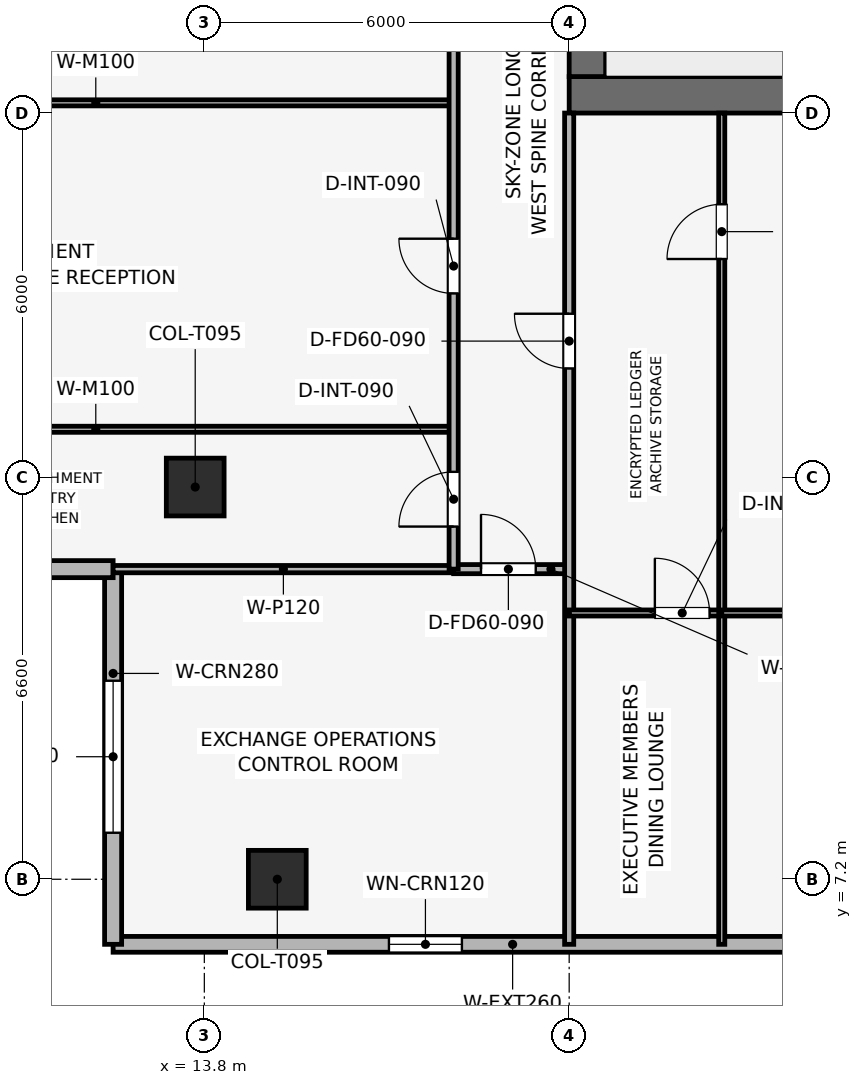
"""IFC4 building model, lengths in metres.
Left out: names, types, materials, properties, quantities, classifications, styles, units other than length and angle.
Written with IfcOpenShell. Run it as: python <this file> out.ifc"""

import sys

from ifc_helpers import new_model, si_unit, direction, frame, frame_2d, origin, origin_2d, place, context, subcontext, project, spatial, rectangle, extrude, element, fill, save


model = new_model("IFC4")
c1 = context("Model", 3, precision=1e-05, world=origin(), true_north=direction((0.0, 1.0)))
c2 = subcontext(c1, "Body", "Model", "MODEL_VIEW")
j1 = project(units=[si_unit("LENGTHUNIT", "METRE"), si_unit("PLANEANGLEUNIT", "RADIAN")], contexts=[c1])
p1 = place(None, origin())
s1 = spatial("IfcSite", under=j1, at=p1, CompositionType="ELEMENT")
p2 = place(p1, origin())
s2 = spatial("IfcBuilding", under=s1, at=p2, CompositionType="ELEMENT")
p3 = place(p2, frame((0.0, 0.0, 306.75)))
s3 = spatial("IfcBuildingStorey", under=s2, at=p3, CompositionType="ELEMENT", Elevation=306.75)
p4 = place(p3, frame((19.8, 20.1, 0.0), z_axis=(0.0, 0.0, 1.0), x_axis=(1.0, 0.0, 0.0)))
e1 = element("IfcWall", 1, at=p4, inside=s3, PredefinedType="SHEAR", context=c2, shape_type="SweptSolid", body=[
    extrude(rectangle(XDim=18.0, YDim=0.6, at=frame_2d((9.0, 0.0))), origin(), (0.0, 0.0, 1.0), 3.75),
])
p5 = place(p3, frame((20.1, 20.4, 0.0), z_axis=(0.0, 0.0, 1.0), x_axis=(0.0, 1.0, 0.0)))
e2 = element("IfcWall", 2, at=p5, inside=s3, PredefinedType="SHEAR", context=c2, shape_type="SweptSolid", body=[
    extrude(rectangle(XDim=16.8, YDim=0.6, at=frame_2d((8.4, 0.0))), origin(), (0.0, 0.0, 1.0), 3.75),
])
p6 = place(p5, frame((10.4, 0.0, 0.0)))
e3 = element("IfcOpeningElement", 3, at=p6, cuts=e2, PredefinedType="OPENING", context=c2, shape_type="SweptSolid", body=[
    extrude(rectangle(XDim=1.1, YDim=2.15, at=frame_2d((0.55, 1.075))), frame((0.0, 0.31, 0.0), z_axis=(0.0, -1.0, 0.0), x_axis=(1.0, 0.0, 0.0)), (0.0, 0.0, 1.0), 0.62),
])
for number, where, z_axis, x_axis in (
    (4, (15.0, 7.2, 0.003), (0.0, 0.0, 1.0), (1.0, 0.0, 0.0)),
    (5, (13.65, 13.65, 0.003), (0.0, 0.0, 1.0), (1.0, 0.0, 0.0)),
):
    element("IfcColumn", number, at=place(p3, frame(where, z_axis=z_axis, x_axis=x_axis)), inside=s3, PredefinedType="COLUMN", context=c2, shape_type="SweptSolid", body=[
        extrude(rectangle(XDim=0.95, YDim=0.95, at=origin_2d()), origin(), (0.0, 0.0, 1.0), 3.504),
    ])
p7 = place(p3, frame((24.0, 6.13, 0.0), z_axis=(0.0, 0.0, 1.0), x_axis=(-1.0, 0.0, 0.0)))
e6 = element("IfcWall", 6, at=p7, inside=s3, PredefinedType="SOLIDWALL", context=c2, shape_type="SweptSolid", body=[
    extrude(rectangle(XDim=11.7, YDim=0.26, at=frame_2d((5.85, 0.0))), origin(), (0.0, 0.0, 1.0), 3.51),
])
p8 = place(p7, frame((5.964, 0.0, 0.9)))
e7 = element("IfcOpeningElement", 7, at=p8, cuts=e6, PredefinedType="OPENING", context=c2, shape_type="SweptSolid", body=[
    extrude(rectangle(XDim=1.2, YDim=2.1, at=frame_2d((0.6, 1.05))), frame((0.0, 0.14, 0.0), z_axis=(0.0, -1.0, 0.0), x_axis=(1.0, 0.0, 0.0)), (0.0, 0.0, 1.0), 0.28),
])
p9 = place(p3, frame((12.3, 6.13, 0.0), z_axis=(0.0, 0.0, 1.0), x_axis=(0.0, 1.0, 0.0)))
e8 = element("IfcWall", 8, at=p9, inside=s3, PredefinedType="SOLIDWALL", context=c2, shape_type="SweptSolid", body=[
    extrude(rectangle(XDim=6.17, YDim=0.28, at=frame_2d((3.085, 0.0))), origin(), (0.0, 0.0, 1.0), 3.51),
])
p10 = place(p9, frame((1.835, 0.0, 0.9)))
e9 = element("IfcOpeningElement", 9, at=p10, cuts=e8, PredefinedType="OPENING", context=c2, shape_type="SweptSolid", body=[
    extrude(rectangle(XDim=2.5, YDim=1.9, at=frame_2d((1.25, 0.95))), frame((0.0, 0.15, 0.0), z_axis=(0.0, -1.0, 0.0), x_axis=(1.0, 0.0, 0.0)), (0.0, 0.0, 1.0), 0.3),
])
p11 = place(p3, frame((12.3, 12.3, 0.0), z_axis=(0.0, 0.0, 1.0), x_axis=(-1.0, 0.0, 0.0)))
e10 = element("IfcWall", 10, at=p11, inside=s3, PredefinedType="SOLIDWALL", context=c2, shape_type="SweptSolid", body=[
    extrude(rectangle(XDim=6.17, YDim=0.28, at=frame_2d((3.085, 0.0))), origin(), (0.0, 0.0, 1.0), 3.51),
])
p12 = place(p11, frame((1.835, 0.0, 0.9)))
e11 = element("IfcOpeningElement", 11, at=p12, cuts=e10, PredefinedType="OPENING", context=c2, shape_type="SweptSolid", body=[
    extrude(rectangle(XDim=2.5, YDim=1.9, at=frame_2d((1.25, 0.95))), frame((0.0, 0.15, 0.0), z_axis=(0.0, -1.0, 0.0), x_axis=(1.0, 0.0, 0.0)), (0.0, 0.0, 1.0), 0.3),
])
p13 = place(p3, frame((6.13, 14.6, 0.0), z_axis=(0.0, 0.0, 1.0), x_axis=(1.0, 0.0, 0.0)))
e12 = element("IfcWall", 12, at=p13, inside=s3, PredefinedType="MOVABLE", context=c2, shape_type="SweptSolid", body=[
    extrude(rectangle(XDim=11.77, YDim=0.1, at=frame_2d((5.885, 0.0))), origin(), (0.0, 0.0, 1.0), 3.095),
])
p14 = place(p3, frame((6.13, 19.968, 0.0), z_axis=(0.0, 0.0, 1.0), x_axis=(1.0, 0.0, 0.0)))
e13 = element("IfcWall", 13, at=p14, inside=s3, PredefinedType="MOVABLE", context=c2, shape_type="SweptSolid", body=[
    extrude(rectangle(XDim=11.77, YDim=0.1, at=frame_2d((5.885, 0.0))), origin(), (0.0, 0.0, 1.0), 3.195),
])
p15 = place(p3, frame((12.3, 12.3, 0.0), z_axis=(0.0, 0.0, 1.0), x_axis=(1.0, 0.0, 0.0)))
e14 = element("IfcWall", 14, at=p15, inside=s3, PredefinedType="PARTITIONING", context=c2, shape_type="SweptSolid", body=[
    extrude(rectangle(XDim=5.6, YDim=0.12, at=frame_2d((2.8, 0.0))), origin(), (0.0, 0.0, 1.0), 3.195),
])
p16 = place(p3, frame((17.9, 12.3, 0.0), z_axis=(0.0, 0.0, 1.0), x_axis=(1.0, 0.0, 0.0)))
e15 = element("IfcWall", 15, at=p16, inside=s3, PredefinedType="PARTITIONING", context=c2, shape_type="SweptSolid", body=[
    extrude(rectangle(XDim=1.9, YDim=0.15, at=frame_2d((0.95, 0.0))), origin(), (0.0, 0.0, 1.0), 3.51),
])
p17 = place(p16, frame((0.45, 0.0, 0.0)))
e16 = element("IfcOpeningElement", 16, at=p17, cuts=e15, PredefinedType="OPENING", context=c2, shape_type="SweptSolid", body=[
    extrude(rectangle(XDim=0.9, YDim=2.1, at=frame_2d((0.45, 1.05))), frame((0.0, 0.085, 0.0), z_axis=(0.0, -1.0, 0.0), x_axis=(1.0, 0.0, 0.0)), (0.0, 0.0, 1.0), 0.17),
])
p18 = place(p3, frame((19.8, 6.13, 0.0), z_axis=(0.0, 0.0, 1.0), x_axis=(0.0, 1.0, 0.0)))
e17 = element("IfcWall", 17, at=p18, inside=s3, PredefinedType="PARTITIONING", context=c2, shape_type="SweptSolid", body=[
    extrude(rectangle(XDim=13.67, YDim=0.15, at=frame_2d((6.835, 0.0))), origin(), (0.0, 0.0, 1.0), 3.095),
])
p19 = place(p18, frame((9.47, 0.0, 0.0)))
e18 = element("IfcOpeningElement", 18, at=p19, cuts=e17, PredefinedType="OPENING", context=c2, shape_type="SweptSolid", body=[
    extrude(rectangle(XDim=0.9, YDim=2.1, at=frame_2d((0.45, 1.05))), frame((0.0, 0.085, 0.0), z_axis=(0.0, -1.0, 0.0), x_axis=(1.0, 0.0, 0.0)), (0.0, 0.0, 1.0), 0.17),
])
p20 = place(p3, frame((19.8, 11.579, 0.0), z_axis=(0.0, 0.0, 1.0), x_axis=(1.0, 0.0, 0.0)))
e19 = element("IfcWall", 19, at=p20, inside=s3, PredefinedType="MOVABLE", context=c2, shape_type="SweptSolid", body=[
    extrude(rectangle(XDim=2.509, YDim=0.1, at=frame_2d((1.254, 0.0))), origin(), (0.0, 0.0, 1.0), 3.095),
])
p21 = place(p20, frame((1.409, 0.0, 0.0)))
e20 = element("IfcOpeningElement", 20, at=p21, cuts=e19, PredefinedType="OPENING", context=c2, shape_type="SweptSolid", body=[
    extrude(rectangle(XDim=0.9, YDim=2.1, at=frame_2d((0.45, 1.05))), frame((0.0, 0.06, 0.0), z_axis=(0.0, -1.0, 0.0), x_axis=(1.0, 0.0, 0.0)), (0.0, 0.0, 1.0), 0.12),
])
p22 = place(p3, frame((22.309, 6.13, 0.0), z_axis=(0.0, 0.0, 1.0), x_axis=(0.0, 1.0, 0.0)))
e21 = element("IfcWall", 21, at=p22, inside=s3, PredefinedType="MOVABLE", context=c2, shape_type="SweptSolid", body=[
    extrude(rectangle(XDim=13.67, YDim=0.1, at=frame_2d((6.835, 0.0))), origin(), (0.0, 0.0, 1.0), 3.135),
])
p23 = place(p22, frame((11.27, 0.0, 0.0)))
e22 = element("IfcOpeningElement", 22, at=p23, cuts=e21, PredefinedType="OPENING", context=c2, shape_type="SweptSolid", body=[
    extrude(rectangle(XDim=0.9, YDim=2.1, at=frame_2d((0.45, 1.05))), frame((0.0, 0.06, 0.0), z_axis=(0.0, -1.0, 0.0), x_axis=(1.0, 0.0, 0.0)), (0.0, 0.0, 1.0), 0.12),
])
p24 = place(p3, frame((22.309, 11.579, 0.0), z_axis=(0.0, 0.0, 1.0), x_axis=(1.0, 0.0, 0.0)))
e23 = element("IfcWall", 23, at=p24, inside=s3, PredefinedType="MOVABLE", context=c2, shape_type="SweptSolid", body=[
    extrude(rectangle(XDim=22.991, YDim=0.1, at=frame_2d((11.496, 0.0))), origin(), (0.0, 0.0, 1.0), 3.095),
])
p25 = place(p24, frame((12.853, 0.0, 0.0)))
e24 = element("IfcOpeningElement", 24, at=p25, cuts=e23, PredefinedType="OPENING", context=c2, shape_type="SweptSolid", body=[
    extrude(rectangle(XDim=0.9, YDim=2.1, at=frame_2d((0.45, 1.05))), frame((0.0, 0.06, 0.0), z_axis=(0.0, -1.0, 0.0), x_axis=(1.0, 0.0, 0.0)), (0.0, 0.0, 1.0), 0.12),
])
p26 = place(p3, frame((17.9, 12.3, 0.0), z_axis=(0.0, 0.0, 1.0), x_axis=(0.0, 1.0, 0.0)))
e25 = element("IfcWall", 25, at=p26, inside=s3, PredefinedType="PARTITIONING", context=c2, shape_type="SweptSolid", body=[
    extrude(rectangle(XDim=27.4, YDim=0.15, at=frame_2d((13.7, 0.0))), origin(), (0.0, 0.0, 1.0), 3.095),
])
p27 = place(p26, frame((0.7, 0.0, 0.0)))
e26 = element("IfcOpeningElement", 26, at=p27, cuts=e25, PredefinedType="OPENING", context=c2, shape_type="SweptSolid", body=[
    extrude(rectangle(XDim=0.9, YDim=2.1, at=frame_2d((0.45, 1.05))), frame((0.0, 0.085, 0.0), z_axis=(0.0, -1.0, 0.0), x_axis=(1.0, 0.0, 0.0)), (0.0, 0.0, 1.0), 0.17),
])
p28 = place(p26, frame((4.534, 0.0, 0.0)))
e27 = element("IfcOpeningElement", 27, at=p28, cuts=e25, PredefinedType="OPENING", context=c2, shape_type="SweptSolid", body=[
    extrude(rectangle(XDim=0.9, YDim=2.1, at=frame_2d((0.45, 1.05))), frame((0.0, 0.085, 0.0), z_axis=(0.0, -1.0, 0.0), x_axis=(1.0, 0.0, 0.0)), (0.0, 0.0, 1.0), 0.17),
])
p29 = place(p26, frame((11.234, 0.0, 0.0)))
e28 = element("IfcOpeningElement", 28, at=p29, cuts=e25, PredefinedType="OPENING", context=c2, shape_type="SweptSolid", body=[
    extrude(rectangle(XDim=0.9, YDim=2.1, at=frame_2d((0.45, 1.05))), frame((0.0, 0.085, 0.0), z_axis=(0.0, -1.0, 0.0), x_axis=(1.0, 0.0, 0.0)), (0.0, 0.0, 1.0), 0.17),
])
p30 = place(p26, frame((16.65, 0.0, 0.0)))
e29 = element("IfcOpeningElement", 29, at=p30, cuts=e25, PredefinedType="OPENING", context=c2, shape_type="SweptSolid", body=[
    extrude(rectangle(XDim=0.9, YDim=2.1, at=frame_2d((0.45, 1.05))), frame((0.0, 0.085, 0.0), z_axis=(0.0, -1.0, 0.0), x_axis=(1.0, 0.0, 0.0)), (0.0, 0.0, 1.0), 0.17),
])
p31 = place(p26, frame((19.55, 0.0, 0.0)))
e30 = element("IfcOpeningElement", 30, at=p31, cuts=e25, PredefinedType="OPENING", context=c2, shape_type="SweptSolid", body=[
    extrude(rectangle(XDim=0.9, YDim=2.1, at=frame_2d((0.45, 1.05))), frame((0.0, 0.085, 0.0), z_axis=(0.0, -1.0, 0.0), x_axis=(1.0, 0.0, 0.0)), (0.0, 0.0, 1.0), 0.17),
])
p32 = place(p26, frame((22.3, 0.0, 0.0)))
e31 = element("IfcOpeningElement", 31, at=p32, cuts=e25, PredefinedType="OPENING", context=c2, shape_type="SweptSolid", body=[
    extrude(rectangle(XDim=0.95, YDim=2.1, at=frame_2d((0.475, 1.05))), frame((0.0, 0.085, 0.0), z_axis=(0.0, -1.0, 0.0), x_axis=(1.0, 0.0, 0.0)), (0.0, 0.0, 1.0), 0.17),
])
p33 = place(p26, frame((25.3, 0.0, 0.0)))
e32 = element("IfcOpeningElement", 32, at=p33, cuts=e25, PredefinedType="OPENING", context=c2, shape_type="SweptSolid", body=[
    extrude(rectangle(XDim=0.9, YDim=2.1, at=frame_2d((0.45, 1.05))), frame((0.0, 0.085, 0.0), z_axis=(0.0, -1.0, 0.0), x_axis=(1.0, 0.0, 0.0)), (0.0, 0.0, 1.0), 0.17),
])
p34 = place(p8, origin())
e33 = element("IfcWindow", 33, at=p34, inside=s3, PartitioningType="SINGLE_PANEL", PredefinedType="WINDOW", context=c2, shape_type="SweptSolid", body=[
    extrude(rectangle(XDim=1.2, YDim=2.1, at=frame_2d((0.6, 1.05))), frame((0.0, 0.03, 0.0), z_axis=(0.0, -1.0, 0.0), x_axis=(1.0, 0.0, 0.0)), (0.0, 0.0, 1.0), 0.06),
])
fill(e7, e33)
p35 = place(p10, origin())
e34 = element("IfcWindow", 34, at=p35, inside=s3, PartitioningType="SINGLE_PANEL", PredefinedType="WINDOW", context=c2, shape_type="SweptSolid", body=[
    extrude(rectangle(XDim=2.5, YDim=1.9, at=frame_2d((1.25, 0.95))), frame((0.0, 0.03, 0.0), z_axis=(0.0, -1.0, 0.0), x_axis=(1.0, 0.0, 0.0)), (0.0, 0.0, 1.0), 0.06),
])
fill(e9, e34)
p36 = place(p17, origin())
e35 = element("IfcDoor", 35, at=p36, inside=s3, OperationType="SINGLE_SWING_LEFT", PredefinedType="DOOR", context=c2, shape_type="SweptSolid", body=[
    extrude(rectangle(XDim=0.9, YDim=2.1, at=frame_2d((0.45, 1.05))), frame((0.0, 0.025, 0.0), z_axis=(0.0, -1.0, 0.0), x_axis=(1.0, 0.0, 0.0)), (0.0, 0.0, 1.0), 0.05),
])
fill(e16, e35)
p37 = place(p19, origin())
e36 = element("IfcDoor", 36, at=p37, inside=s3, OperationType="SINGLE_SWING_RIGHT", PredefinedType="DOOR", context=c2, shape_type="SweptSolid", body=[
    extrude(rectangle(XDim=0.9, YDim=2.1, at=frame_2d((0.45, 1.05))), frame((0.0, 0.025, 0.0), z_axis=(0.0, -1.0, 0.0), x_axis=(1.0, 0.0, 0.0)), (0.0, 0.0, 1.0), 0.05),
])
fill(e18, e36)
p38 = place(p21, origin())
e37 = element("IfcDoor", 37, at=p38, inside=s3, OperationType="SINGLE_SWING_LEFT", PredefinedType="DOOR", context=c2, shape_type="SweptSolid", body=[
    extrude(rectangle(XDim=0.9, YDim=2.1, at=frame_2d((0.45, 1.05))), frame((0.0, 0.025, 0.0), z_axis=(0.0, -1.0, 0.0), x_axis=(1.0, 0.0, 0.0)), (0.0, 0.0, 1.0), 0.05),
])
fill(e20, e37)
p39 = place(p23, origin())
e38 = element("IfcDoor", 38, at=p39, inside=s3, OperationType="SINGLE_SWING_LEFT", PredefinedType="DOOR", context=c2, shape_type="SweptSolid", body=[
    extrude(rectangle(XDim=0.9, YDim=2.1, at=frame_2d((0.45, 1.05))), frame((0.0, 0.025, 0.0), z_axis=(0.0, -1.0, 0.0), x_axis=(1.0, 0.0, 0.0)), (0.0, 0.0, 1.0), 0.05),
])
fill(e22, e38)
p40 = place(p27, origin())
e39 = element("IfcDoor", 39, at=p40, inside=s3, OperationType="SINGLE_SWING_LEFT", PredefinedType="DOOR", context=c2, shape_type="SweptSolid", body=[
    extrude(rectangle(XDim=0.9, YDim=2.1, at=frame_2d((0.45, 1.05))), frame((0.0, 0.025, 0.0), z_axis=(0.0, -1.0, 0.0), x_axis=(1.0, 0.0, 0.0)), (0.0, 0.0, 1.0), 0.05),
])
fill(e26, e39)
p41 = place(p28, origin())
e40 = element("IfcDoor", 40, at=p41, inside=s3, OperationType="SINGLE_SWING_RIGHT", PredefinedType="DOOR", context=c2, shape_type="SweptSolid", body=[
    extrude(rectangle(XDim=0.9, YDim=2.1, at=frame_2d((0.45, 1.05))), frame((0.0, 0.025, 0.0), z_axis=(0.0, -1.0, 0.0), x_axis=(1.0, 0.0, 0.0)), (0.0, 0.0, 1.0), 0.05),
])
fill(e27, e40)
save(model, sys.argv[1])
